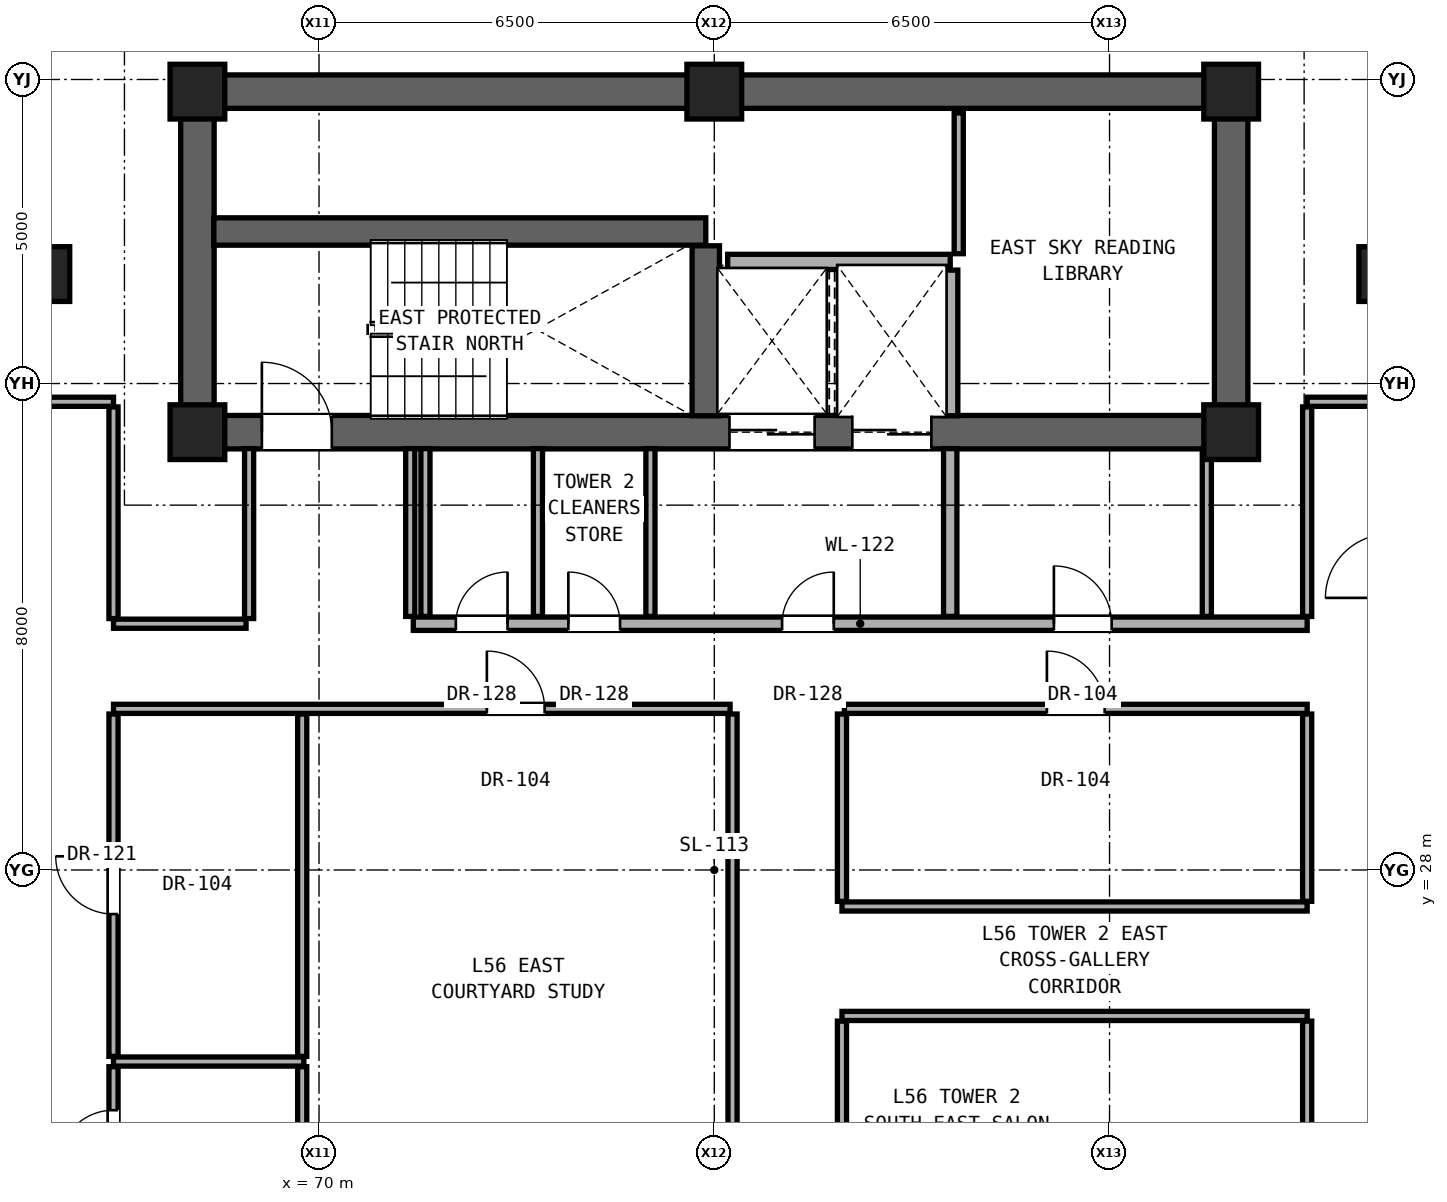
"""IFC4 building model, lengths in metres.
Left out: names, types, materials, properties, quantities, classifications, styles, units other than length and angle.
Written with IfcOpenShell. Run it as: python <this file> out.ifc"""

import sys

from ifc_helpers import new_model, si_unit, direction, frame, frame_2d, origin, origin_2d, place, context, subcontext, project, spatial, rectangle, extrude, element, fill, save


model = new_model("IFC4")
c1 = context("Model", 3, precision=1e-05, world=origin(), true_north=direction((0.0, 1.0)))
c2 = subcontext(c1, "Body", "Model", "MODEL_VIEW")
j1 = project(units=[si_unit("LENGTHUNIT", "METRE"), si_unit("PLANEANGLEUNIT", "RADIAN")], contexts=[c1])
p1 = place(None, origin())
s1 = spatial("IfcSite", under=j1, at=p1, CompositionType="ELEMENT")
p2 = place(p1, origin())
s2 = spatial("IfcBuilding", under=s1, at=p2, CompositionType="ELEMENT")
p3 = place(p2, frame((0.0, 0.0, 196.65)))
s3 = spatial("IfcBuildingStorey", under=s2, at=p3, CompositionType="ELEMENT", Elevation=196.65)
for number, where, z_axis, x_axis in (
    (1, (68.0, 35.2, 0.0), (0.0, 0.0, 1.0), (1.0, 0.0, 0.0)),
    (2, (85.0, 35.2, 0.0), (0.0, 0.0, 1.0), (1.0, 0.0, 0.0)),
    (3, (68.0, 40.8, 0.0), (0.0, 0.0, 1.0), (1.0, 0.0, 0.0)),
    (4, (76.5, 40.8, 0.0), (0.0, 0.0, 1.0), (1.0, 0.0, 0.0)),
    (5, (85.0, 40.8, 0.0), (0.0, 0.0, 1.0), (1.0, 0.0, 0.0)),
):
    element("IfcColumn", number, at=place(p3, frame(where, z_axis=z_axis, x_axis=x_axis)), inside=s3, PredefinedType="COLUMN", context=c2, shape_type="SweptSolid", body=[
        extrude(rectangle(XDim=0.9, YDim=0.9, at=origin_2d()), origin(), (0.0, 0.0, 1.0), 3.25),
    ])
for number, where, z_axis, x_axis in (
    (6, (65.6, 37.8, 0.0), (0.0, 0.0, 1.0), (1.0, 0.0, 0.0)),
    (7, (87.4, 37.8, 0.0), (0.0, 0.0, 1.0), (1.0, 0.0, 0.0)),
):
    element("IfcColumn", number, at=place(p3, frame(where, z_axis=z_axis, x_axis=x_axis)), inside=s3, PredefinedType="PILASTER", context=c2, shape_type="SweptSolid", body=[
        extrude(rectangle(XDim=0.6, YDim=0.9, at=origin_2d()), origin(), (0.0, 0.0, 1.0), 3.25),
    ])
p4 = place(p3, frame((68.0, 40.8, 0.0), z_axis=(0.0, 0.0, 1.0), x_axis=(1.0, 0.0, 0.0)))
e8 = element("IfcWall", 8, at=p4, inside=s3, PredefinedType="SHEAR", context=c2, shape_type="SweptSolid", body=[
    extrude(rectangle(XDim=17.0, YDim=0.55, at=frame_2d((8.5, 0.0))), origin(), (0.0, 0.0, 1.0), 3.05),
])
for number, where, z_axis, x_axis in (
    (9, (68.0, 35.2, 0.0), (0.0, 0.0, 1.0), (0.0, 1.0, 0.0)),
    (10, (85.0, 35.2, 0.0), (0.0, 0.0, 1.0), (0.0, 1.0, 0.0)),
):
    element("IfcWall", number, at=place(p3, frame(where, z_axis=z_axis, x_axis=x_axis)), inside=s3, PredefinedType="SHEAR", context=c2, shape_type="SweptSolid", body=[
        extrude(rectangle(XDim=5.6, YDim=0.55, at=frame_2d((2.8, 0.0))), origin(), (0.0, 0.0, 1.0), 3.05),
    ])
p5 = place(p3, frame((68.0, 35.2, 0.0), z_axis=(0.0, 0.0, 1.0), x_axis=(1.0, 0.0, 0.0)))
e11 = element("IfcWall", 11, at=p5, inside=s3, PredefinedType="SHEAR", context=c2, shape_type="SweptSolid", body=[
    extrude(rectangle(XDim=17.0, YDim=0.55, at=frame_2d((8.5, 0.0))), origin(), (0.0, 0.0, 1.0), 3.05),
])
p6 = place(p5, frame((1.06, 0.0, 0.0)))
e12 = element("IfcOpeningElement", 12, at=p6, cuts=e11, PredefinedType="OPENING", context=c2, shape_type="SweptSolid", body=[
    extrude(rectangle(XDim=1.15, YDim=2.2, at=frame_2d((0.575, 1.1))), frame((0.0, 0.285, 0.0), z_axis=(0.0, -1.0, 0.0), x_axis=(1.0, 0.0, 0.0)), (0.0, 0.0, 1.0), 0.57),
])
p7 = place(p5, frame((8.75, 0.0, 0.0)))
e13 = element("IfcOpeningElement", 13, at=p7, cuts=e11, PredefinedType="OPENING", context=c2, shape_type="SweptSolid", body=[
    extrude(rectangle(XDim=1.4, YDim=2.35, at=frame_2d((0.7, 1.175))), frame((0.0, 0.285, 0.0), z_axis=(0.0, -1.0, 0.0), x_axis=(1.0, 0.0, 0.0)), (0.0, 0.0, 1.0), 0.57),
])
p8 = place(p5, frame((10.77, 0.0, 0.0)))
e14 = element("IfcOpeningElement", 14, at=p8, cuts=e11, PredefinedType="OPENING", context=c2, shape_type="SweptSolid", body=[
    extrude(rectangle(XDim=1.3, YDim=2.3, at=frame_2d((0.65, 1.15))), frame((0.0, 0.285, 0.0), z_axis=(0.0, -1.0, 0.0), x_axis=(1.0, 0.0, 0.0)), (0.0, 0.0, 1.0), 0.57),
])
p9 = place(p3, frame((66.62, 24.85, 0.0), z_axis=(0.0, 0.0, 1.0), x_axis=(1.0, 0.0, 0.0)))
e15 = element("IfcWall", 15, at=p9, inside=s3, PredefinedType="PARTITIONING", context=c2, shape_type="SweptSolid", body=[
    extrude(rectangle(XDim=3.13, YDim=0.15, at=frame_2d((1.565, 0.0))), origin(), (0.0, 0.0, 1.0), 2.186),
])
for number, where, z_axis, x_axis in (
    (16, (78.6, 25.6, 0.0), (0.0, 0.0, 1.0), (1.0, 0.0, 0.0)),
    (17, (78.6, 27.4, 0.0), (0.0, 0.0, 1.0), (1.0, 0.0, 0.0)),
):
    element("IfcWall", number, at=place(p3, frame(where, z_axis=z_axis, x_axis=x_axis)), inside=s3, PredefinedType="PARTITIONING", context=c2, shape_type="SweptSolid", body=[
        extrude(rectangle(XDim=7.65, YDim=0.15, at=frame_2d((3.825, 0.0))), origin(), (0.0, 0.0, 1.0), 2.186),
    ])
p10 = place(p3, frame((66.62, 30.65, 0.0), z_axis=(0.0, 0.0, 1.0), x_axis=(1.0, 0.0, 0.0)))
e18 = element("IfcWall", 18, at=p10, inside=s3, PredefinedType="PARTITIONING", context=c2, shape_type="SweptSolid", body=[
    extrude(rectangle(XDim=10.14, YDim=0.15, at=frame_2d((5.07, 0.0))), origin(), (0.0, 0.0, 1.0), 2.186),
])
p11 = place(p10, frame((6.14, 0.0, 0.0)))
e19 = element("IfcOpeningElement", 19, at=p11, cuts=e18, PredefinedType="OPENING", context=c2, shape_type="SweptSolid", body=[
    extrude(rectangle(XDim=0.95, YDim=2.15, at=frame_2d((0.475, 1.075))), frame((0.0, 0.085, 0.0), z_axis=(0.0, -1.0, 0.0), x_axis=(1.0, 0.0, 0.0)), (0.0, 0.0, 1.0), 0.17),
])
p12 = place(p3, frame((78.64, 30.65, 0.0), z_axis=(0.0, 0.0, 1.0), x_axis=(1.0, 0.0, 0.0)))
e20 = element("IfcWall", 20, at=p12, inside=s3, PredefinedType="PARTITIONING", context=c2, shape_type="SweptSolid", body=[
    extrude(rectangle(XDim=7.61, YDim=0.15, at=frame_2d((3.805, 0.0))), origin(), (0.0, 0.0, 1.0), 2.186),
])
p13 = place(p12, frame((3.33, 0.0, 0.0)))
e21 = element("IfcOpeningElement", 21, at=p13, cuts=e20, PredefinedType="OPENING", context=c2, shape_type="SweptSolid", body=[
    extrude(rectangle(XDim=0.95, YDim=2.15, at=frame_2d((0.475, 1.075))), frame((0.0, 0.085, 0.0), z_axis=(0.0, -1.0, 0.0), x_axis=(1.0, 0.0, 0.0)), (0.0, 0.0, 1.0), 0.17),
])
p14 = place(p3, frame((66.62, 32.05, 0.0), z_axis=(0.0, 0.0, 1.0), x_axis=(1.0, 0.0, 0.0)))
e22 = element("IfcWall", 22, at=p14, inside=s3, PredefinedType="PARTITIONING", context=c2, shape_type="SweptSolid", body=[
    extrude(rectangle(XDim=2.18, YDim=0.15, at=frame_2d((1.09, 0.0))), origin(), (0.0, 0.0, 1.0), 2.186),
])
p15 = place(p3, frame((71.55, 32.05, 0.0), z_axis=(0.0, 0.0, 1.0), x_axis=(1.0, 0.0, 0.0)))
e23 = element("IfcWall", 23, at=p15, inside=s3, PredefinedType="SOLIDWALL", context=c2, shape_type="SweptSolid", body=[
    extrude(rectangle(XDim=14.7, YDim=0.22, at=frame_2d((7.35, 0.0))), origin(), (0.0, 0.0, 1.0), 2.186),
])
p16 = place(p15, frame((6.065, 0.0, 0.0)))
e24 = element("IfcOpeningElement", 24, at=p16, cuts=e23, PredefinedType="OPENING", context=c2, shape_type="SweptSolid", body=[
    extrude(rectangle(XDim=0.85, YDim=2.01, at=frame_2d((0.425, 1.005))), frame((0.0, 0.12, 0.0), z_axis=(0.0, -1.0, 0.0), x_axis=(1.0, 0.0, 0.0)), (0.0, 0.0, 1.0), 0.24),
])
p17 = place(p15, frame((10.535, 0.0, 0.0)))
e25 = element("IfcOpeningElement", 25, at=p17, cuts=e23, PredefinedType="OPENING", context=c2, shape_type="SweptSolid", body=[
    extrude(rectangle(XDim=0.95, YDim=2.15, at=frame_2d((0.475, 1.075))), frame((0.0, 0.12, 0.0), z_axis=(0.0, -1.0, 0.0), x_axis=(1.0, 0.0, 0.0)), (0.0, 0.0, 1.0), 0.24),
])
p18 = place(p15, frame((0.7, 0.0, 0.0)))
e26 = element("IfcOpeningElement", 26, at=p18, cuts=e23, PredefinedType="OPENING", context=c2, shape_type="SweptSolid", body=[
    extrude(rectangle(XDim=0.85, YDim=2.01, at=frame_2d((0.425, 1.005))), frame((0.0, 0.12, 0.0), z_axis=(0.0, -1.0, 0.0), x_axis=(1.0, 0.0, 0.0)), (0.0, 0.0, 1.0), 0.24),
])
p19 = place(p15, frame((2.55, 0.0, 0.0)))
e27 = element("IfcOpeningElement", 27, at=p19, cuts=e23, PredefinedType="OPENING", context=c2, shape_type="SweptSolid", body=[
    extrude(rectangle(XDim=0.85, YDim=2.01, at=frame_2d((0.425, 1.005))), frame((0.0, 0.12, 0.0), z_axis=(0.0, -1.0, 0.0), x_axis=(1.0, 0.0, 0.0)), (0.0, 0.0, 1.0), 0.24),
])
p20 = place(p3, frame((65.25, 35.7, 0.0), z_axis=(0.0, 0.0, 1.0), x_axis=(1.0, 0.0, 0.0)))
e28 = element("IfcWall", 28, at=p20, inside=s3, PredefinedType="PARTITIONING", context=c2, shape_type="SweptSolid", body=[
    extrude(rectangle(XDim=1.37, YDim=0.15, at=frame_2d((0.685, 0.0))), origin(), (0.0, 0.0, 1.0), 3.05),
])
p21 = place(p3, frame((86.25, 35.7, 0.0), z_axis=(0.0, 0.0, 1.0), x_axis=(1.0, 0.0, 0.0)))
e29 = element("IfcWall", 29, at=p21, inside=s3, PredefinedType="PARTITIONING", context=c2, shape_type="SweptSolid", body=[
    extrude(rectangle(XDim=1.35, YDim=0.15, at=frame_2d((0.675, 0.0))), origin(), (0.0, 0.0, 1.0), 3.05),
])
p22 = place(p3, frame((76.72, 38.0, 0.0), z_axis=(0.0, 0.0, 1.0), x_axis=(1.0, 0.0, 0.0)))
e30 = element("IfcWall", 30, at=p22, inside=s3, PredefinedType="SOLIDWALL", context=c2, shape_type="SweptSolid", body=[
    extrude(rectangle(XDim=3.66, YDim=0.25, at=frame_2d((1.83, 0.0))), origin(), (0.0, 0.0, 1.0), 3.05),
])
p23 = place(p3, frame((68.27, 38.5, 0.0), z_axis=(0.0, 0.0, 1.0), x_axis=(1.0, 0.0, 0.0)))
e31 = element("IfcWall", 31, at=p23, inside=s3, PredefinedType="SHEAR", context=c2, shape_type="SweptSolid", body=[
    extrude(rectangle(XDim=8.09, YDim=0.45, at=frame_2d((4.045, 0.0))), origin(), (0.0, 0.0, 1.0), 3.05),
])
p24 = place(p3, frame((66.62, 22.435, 0.0), z_axis=(0.0, 0.0, 1.0), x_axis=(0.0, 1.0, 0.0)))
e32 = element("IfcWall", 32, at=p24, inside=s3, PredefinedType="PARTITIONING", context=c2, shape_type="SweptSolid", body=[
    extrude(rectangle(XDim=2.33, YDim=0.15, at=frame_2d((1.165, 0.0))), origin(), (0.0, 0.0, 1.0), 3.05),
])
p25 = place(p24, frame((0.715, 0.0, 0.0)))
e33 = element("IfcOpeningElement", 33, at=p25, cuts=e32, PredefinedType="OPENING", context=c2, shape_type="SweptSolid", body=[
    extrude(rectangle(XDim=0.9, YDim=2.1, at=frame_2d((0.45, 1.05))), frame((0.0, 0.085, 0.0), z_axis=(0.0, -1.0, 0.0), x_axis=(1.0, 0.0, 0.0)), (0.0, 0.0, 1.0), 0.17),
])
p26 = place(p3, frame((66.62, 24.935, 0.0), z_axis=(0.0, 0.0, 1.0), x_axis=(0.0, 1.0, 0.0)))
e34 = element("IfcWall", 34, at=p26, inside=s3, PredefinedType="PARTITIONING", context=c2, shape_type="SweptSolid", body=[
    extrude(rectangle(XDim=5.63, YDim=0.15, at=frame_2d((2.815, 0.0))), origin(), (0.0, 0.0, 1.0), 2.346),
])
p27 = place(p26, frame((2.34, 0.0, 0.0)))
e35 = element("IfcOpeningElement", 35, at=p27, cuts=e34, PredefinedType="OPENING", context=c2, shape_type="SweptSolid", body=[
    extrude(rectangle(XDim=0.95, YDim=2.15, at=frame_2d((0.475, 1.075))), frame((0.0, 0.085, 0.0), z_axis=(0.0, -1.0, 0.0), x_axis=(1.0, 0.0, 0.0)), (0.0, 0.0, 1.0), 0.17),
])
p28 = place(p3, frame((66.62, 32.135, 0.0), z_axis=(0.0, 0.0, 1.0), x_axis=(0.0, 1.0, 0.0)))
e36 = element("IfcWall", 36, at=p28, inside=s3, PredefinedType="PARTITIONING", context=c2, shape_type="SweptSolid", body=[
    extrude(rectangle(XDim=3.48, YDim=0.15, at=frame_2d((1.74, 0.0))), origin(), (0.0, 0.0, 1.0), 2.442),
])
p29 = place(p3, frame((68.85, 32.135, 0.0), z_axis=(0.0, 0.0, 1.0), x_axis=(0.0, 1.0, 0.0)))
e37 = element("IfcWall", 37, at=p29, inside=s3, PredefinedType="PARTITIONING", context=c2, shape_type="SweptSolid", body=[
    extrude(rectangle(XDim=2.795, YDim=0.15, at=frame_2d((1.397, 0.0))), origin(), (0.0, 0.0, 1.0), 3.05),
])
p30 = place(p3, frame((69.723, 22.435, 0.0), z_axis=(0.0, 0.0, 1.0), x_axis=(0.0, 1.0, 0.0)))
e38 = element("IfcWall", 38, at=p30, inside=s3, PredefinedType="PARTITIONING", context=c2, shape_type="SweptSolid", body=[
    extrude(rectangle(XDim=2.33, YDim=0.15, at=frame_2d((1.165, 0.0))), origin(), (0.0, 0.0, 1.0), 3.05),
])
p31 = place(p3, frame((69.723, 24.935, 0.0), z_axis=(0.0, 0.0, 1.0), x_axis=(0.0, 1.0, 0.0)))
e39 = element("IfcWall", 39, at=p31, inside=s3, PredefinedType="PARTITIONING", context=c2, shape_type="SweptSolid", body=[
    extrude(rectangle(XDim=5.63, YDim=0.15, at=frame_2d((2.815, 0.0))), origin(), (0.0, 0.0, 1.0), 2.186),
])
for number, where, z_axis, x_axis in (
    (40, (71.5, 32.17, 0.0), (0.0, 0.0, 1.0), (0.0, 1.0, 0.0)),
    (41, (71.75, 32.17, 0.0), (0.0, 0.0, 1.0), (0.0, 1.0, 0.0)),
    (42, (73.6, 32.17, 0.0), (0.0, 0.0, 1.0), (0.0, 1.0, 0.0)),
    (43, (75.45, 32.17, 0.0), (0.0, 0.0, 1.0), (0.0, 1.0, 0.0)),
):
    element("IfcWall", number, at=place(p3, frame(where, z_axis=z_axis, x_axis=x_axis)), inside=s3, PredefinedType="PARTITIONING", context=c2, shape_type="SweptSolid", body=[
        extrude(rectangle(XDim=2.76, YDim=0.15, at=frame_2d((1.38, 0.0))), origin(), (0.0, 0.0, 1.0), 3.05),
    ])
p32 = place(p3, frame((76.36, 35.47, 0.0), z_axis=(0.0, 0.0, 1.0), x_axis=(0.0, 1.0, 0.0)))
e44 = element("IfcWall", 44, at=p32, inside=s3, PredefinedType="SHEAR", context=c2, shape_type="SweptSolid", body=[
    extrude(rectangle(XDim=2.795, YDim=0.45, at=frame_2d((1.397, 0.0))), origin(), (0.0, 0.0, 1.0), 3.05),
])
p33 = place(p3, frame((76.8, 22.435, 0.0), z_axis=(0.0, 0.0, 1.0), x_axis=(0.0, 1.0, 0.0)))
e45 = element("IfcWall", 45, at=p33, inside=s3, PredefinedType="PARTITIONING", context=c2, shape_type="SweptSolid", body=[
    extrude(rectangle(XDim=8.13, YDim=0.15, at=frame_2d((4.065, 0.0))), origin(), (0.0, 0.0, 1.0), 2.186),
])
p34 = place(p3, frame((78.6, 22.435, 0.0), z_axis=(0.0, 0.0, 1.0), x_axis=(0.0, 1.0, 0.0)))
e46 = element("IfcWall", 46, at=p34, inside=s3, PredefinedType="PARTITIONING", context=c2, shape_type="SweptSolid", body=[
    extrude(rectangle(XDim=3.08, YDim=0.15, at=frame_2d((1.54, 0.0))), origin(), (0.0, 0.0, 1.0), 3.05),
])
p35 = place(p3, frame((78.6, 27.485, 0.0), z_axis=(0.0, 0.0, 1.0), x_axis=(0.0, 1.0, 0.0)))
e47 = element("IfcWall", 47, at=p35, inside=s3, PredefinedType="PARTITIONING", context=c2, shape_type="SweptSolid", body=[
    extrude(rectangle(XDim=3.08, YDim=0.15, at=frame_2d((1.54, 0.0))), origin(), (0.0, 0.0, 1.0), 2.186),
])
p36 = place(p3, frame((80.38, 32.17, 0.0), z_axis=(0.0, 0.0, 1.0), x_axis=(0.0, 1.0, 0.0)))
e48 = element("IfcWall", 48, at=p36, inside=s3, PredefinedType="SOLIDWALL", context=c2, shape_type="SweptSolid", body=[
    extrude(rectangle(XDim=2.76, YDim=0.22, at=frame_2d((1.38, 0.0))), origin(), (0.0, 0.0, 1.0), 3.05),
])
p37 = place(p3, frame((80.38, 35.47, 0.0), z_axis=(0.0, 0.0, 1.0), x_axis=(0.0, 1.0, 0.0)))
e49 = element("IfcWall", 49, at=p37, inside=s3, PredefinedType="SOLIDWALL", context=c2, shape_type="SweptSolid", body=[
    extrude(rectangle(XDim=2.395, YDim=0.25, at=frame_2d((1.198, 0.0))), origin(), (0.0, 0.0, 1.0), 3.05),
])
p38 = place(p3, frame((80.52, 38.135, 0.0), z_axis=(0.0, 0.0, 1.0), x_axis=(0.0, 1.0, 0.0)))
e50 = element("IfcWall", 50, at=p38, inside=s3, PredefinedType="PARTITIONING", context=c2, shape_type="SweptSolid", body=[
    extrude(rectangle(XDim=2.315, YDim=0.15, at=frame_2d((1.157, 0.0))), origin(), (0.0, 0.0, 1.0), 3.05),
])
p39 = place(p3, frame((84.6, 32.17, 0.0), z_axis=(0.0, 0.0, 1.0), x_axis=(0.0, 1.0, 0.0)))
e51 = element("IfcWall", 51, at=p39, inside=s3, PredefinedType="PARTITIONING", context=c2, shape_type="SweptSolid", body=[
    extrude(rectangle(XDim=2.76, YDim=0.15, at=frame_2d((1.38, 0.0))), origin(), (0.0, 0.0, 1.0), 3.05),
])
p40 = place(p3, frame((86.25, 22.435, 0.0), z_axis=(0.0, 0.0, 1.0), x_axis=(0.0, 1.0, 0.0)))
e52 = element("IfcWall", 52, at=p40, inside=s3, PredefinedType="PARTITIONING", context=c2, shape_type="SweptSolid", body=[
    extrude(rectangle(XDim=3.08, YDim=0.15, at=frame_2d((1.54, 0.0))), origin(), (0.0, 0.0, 1.0), 3.05),
])
p41 = place(p3, frame((86.25, 27.485, 0.0), z_axis=(0.0, 0.0, 1.0), x_axis=(0.0, 1.0, 0.0)))
e53 = element("IfcWall", 53, at=p41, inside=s3, PredefinedType="PARTITIONING", context=c2, shape_type="SweptSolid", body=[
    extrude(rectangle(XDim=3.08, YDim=0.15, at=frame_2d((1.54, 0.0))), origin(), (0.0, 0.0, 1.0), 2.346),
])
p42 = place(p3, frame((86.25, 32.17, 0.0), z_axis=(0.0, 0.0, 1.0), x_axis=(0.0, 1.0, 0.0)))
e54 = element("IfcWall", 54, at=p42, inside=s3, PredefinedType="PARTITIONING", context=c2, shape_type="SweptSolid", body=[
    extrude(rectangle(XDim=3.445, YDim=0.15, at=frame_2d((1.723, 0.0))), origin(), (0.0, 0.0, 1.0), 2.442),
])
p43 = place(p6, origin())
e55 = element("IfcDoor", 55, at=p43, inside=s3, OperationType="SINGLE_SWING_LEFT", PredefinedType="DOOR", context=c2, shape_type="SweptSolid", body=[
    extrude(rectangle(XDim=1.15, YDim=2.2, at=frame_2d((0.575, 1.1))), frame((0.0, 0.025, 0.0), z_axis=(0.0, -1.0, 0.0), x_axis=(1.0, 0.0, 0.0)), (0.0, 0.0, 1.0), 0.05),
])
fill(e12, e55)
p44 = place(p16, origin())
e56 = element("IfcDoor", 56, at=p44, inside=s3, OperationType="SINGLE_SWING_RIGHT", PredefinedType="DOOR", context=c2, shape_type="SweptSolid", body=[
    extrude(rectangle(XDim=0.85, YDim=2.01, at=frame_2d((0.425, 1.005))), frame((0.0, 0.025, 0.0), z_axis=(0.0, -1.0, 0.0), x_axis=(1.0, 0.0, 0.0)), (0.0, 0.0, 1.0), 0.05),
])
fill(e24, e56)
p45 = place(p17, origin())
e57 = element("IfcDoor", 57, at=p45, inside=s3, OperationType="SINGLE_SWING_LEFT", PredefinedType="DOOR", context=c2, shape_type="SweptSolid", body=[
    extrude(rectangle(XDim=0.95, YDim=2.15, at=frame_2d((0.475, 1.075))), frame((0.0, 0.025, 0.0), z_axis=(0.0, -1.0, 0.0), x_axis=(1.0, 0.0, 0.0)), (0.0, 0.0, 1.0), 0.05),
])
fill(e25, e57)
p46 = place(p18, origin())
e58 = element("IfcDoor", 58, at=p46, inside=s3, OperationType="SINGLE_SWING_RIGHT", PredefinedType="DOOR", context=c2, shape_type="SweptSolid", body=[
    extrude(rectangle(XDim=0.85, YDim=2.01, at=frame_2d((0.425, 1.005))), frame((0.0, 0.025, 0.0), z_axis=(0.0, -1.0, 0.0), x_axis=(1.0, 0.0, 0.0)), (0.0, 0.0, 1.0), 0.05),
])
fill(e26, e58)
p47 = place(p19, origin())
e59 = element("IfcDoor", 59, at=p47, inside=s3, OperationType="SINGLE_SWING_LEFT", PredefinedType="DOOR", context=c2, shape_type="SweptSolid", body=[
    extrude(rectangle(XDim=0.85, YDim=2.01, at=frame_2d((0.425, 1.005))), frame((0.0, 0.025, 0.0), z_axis=(0.0, -1.0, 0.0), x_axis=(1.0, 0.0, 0.0)), (0.0, 0.0, 1.0), 0.05),
])
fill(e27, e59)
p48 = place(p25, origin())
e60 = element("IfcDoor", 60, at=p48, inside=s3, OperationType="SINGLE_SWING_LEFT", PredefinedType="DOOR", context=c2, shape_type="SweptSolid", body=[
    extrude(rectangle(XDim=0.9, YDim=2.1, at=frame_2d((0.45, 1.05))), frame((0.0, 0.025, 0.0), z_axis=(0.0, -1.0, 0.0), x_axis=(1.0, 0.0, 0.0)), (0.0, 0.0, 1.0), 0.05),
])
fill(e33, e60)
p49 = place(p27, origin())
e61 = element("IfcDoor", 61, at=p49, inside=s3, OperationType="SINGLE_SWING_RIGHT", PredefinedType="DOOR", context=c2, shape_type="SweptSolid", body=[
    extrude(rectangle(XDim=0.95, YDim=2.15, at=frame_2d((0.475, 1.075))), frame((0.0, 0.025, 0.0), z_axis=(0.0, -1.0, 0.0), x_axis=(1.0, 0.0, 0.0)), (0.0, 0.0, 1.0), 0.05),
])
fill(e35, e61)
p50 = place(p11, origin())
e62 = element("IfcDoor", 62, at=p50, inside=s3, OperationType="SINGLE_SWING_LEFT", PredefinedType="DOOR", context=c2, shape_type="SweptSolid", body=[
    extrude(rectangle(XDim=0.95, YDim=2.15, at=frame_2d((0.475, 1.075))), frame((0.0, 0.025, 0.0), z_axis=(0.0, -1.0, 0.0), x_axis=(1.0, 0.0, 0.0)), (0.0, 0.0, 1.0), 0.05),
])
fill(e19, e62)
p51 = place(p13, origin())
e63 = element("IfcDoor", 63, at=p51, inside=s3, OperationType="SINGLE_SWING_LEFT", PredefinedType="DOOR", context=c2, shape_type="SweptSolid", body=[
    extrude(rectangle(XDim=0.95, YDim=2.15, at=frame_2d((0.475, 1.075))), frame((0.0, 0.025, 0.0), z_axis=(0.0, -1.0, 0.0), x_axis=(1.0, 0.0, 0.0)), (0.0, 0.0, 1.0), 0.05),
])
fill(e21, e63)
p52 = place(p7, origin())
e64 = element("IfcDoor", 64, at=p52, inside=s3, OperationType="DOUBLE_DOOR_SLIDING", PredefinedType="DOOR", context=c2, shape_type="SweptSolid", body=[
    extrude(rectangle(XDim=1.4, YDim=2.35, at=frame_2d((0.7, 1.175))), frame((0.0, 0.025, 0.0), z_axis=(0.0, -1.0, 0.0), x_axis=(1.0, 0.0, 0.0)), (0.0, 0.0, 1.0), 0.05),
])
fill(e13, e64)
p53 = place(p8, origin())
e65 = element("IfcDoor", 65, at=p53, inside=s3, OperationType="DOUBLE_DOOR_SLIDING", PredefinedType="DOOR", context=c2, shape_type="SweptSolid", body=[
    extrude(rectangle(XDim=1.3, YDim=2.3, at=frame_2d((0.65, 1.15))), frame((0.0, 0.025, 0.0), z_axis=(0.0, -1.0, 0.0), x_axis=(1.0, 0.0, 0.0)), (0.0, 0.0, 1.0), 0.05),
])
fill(e14, e65)
save(model, sys.argv[1])
